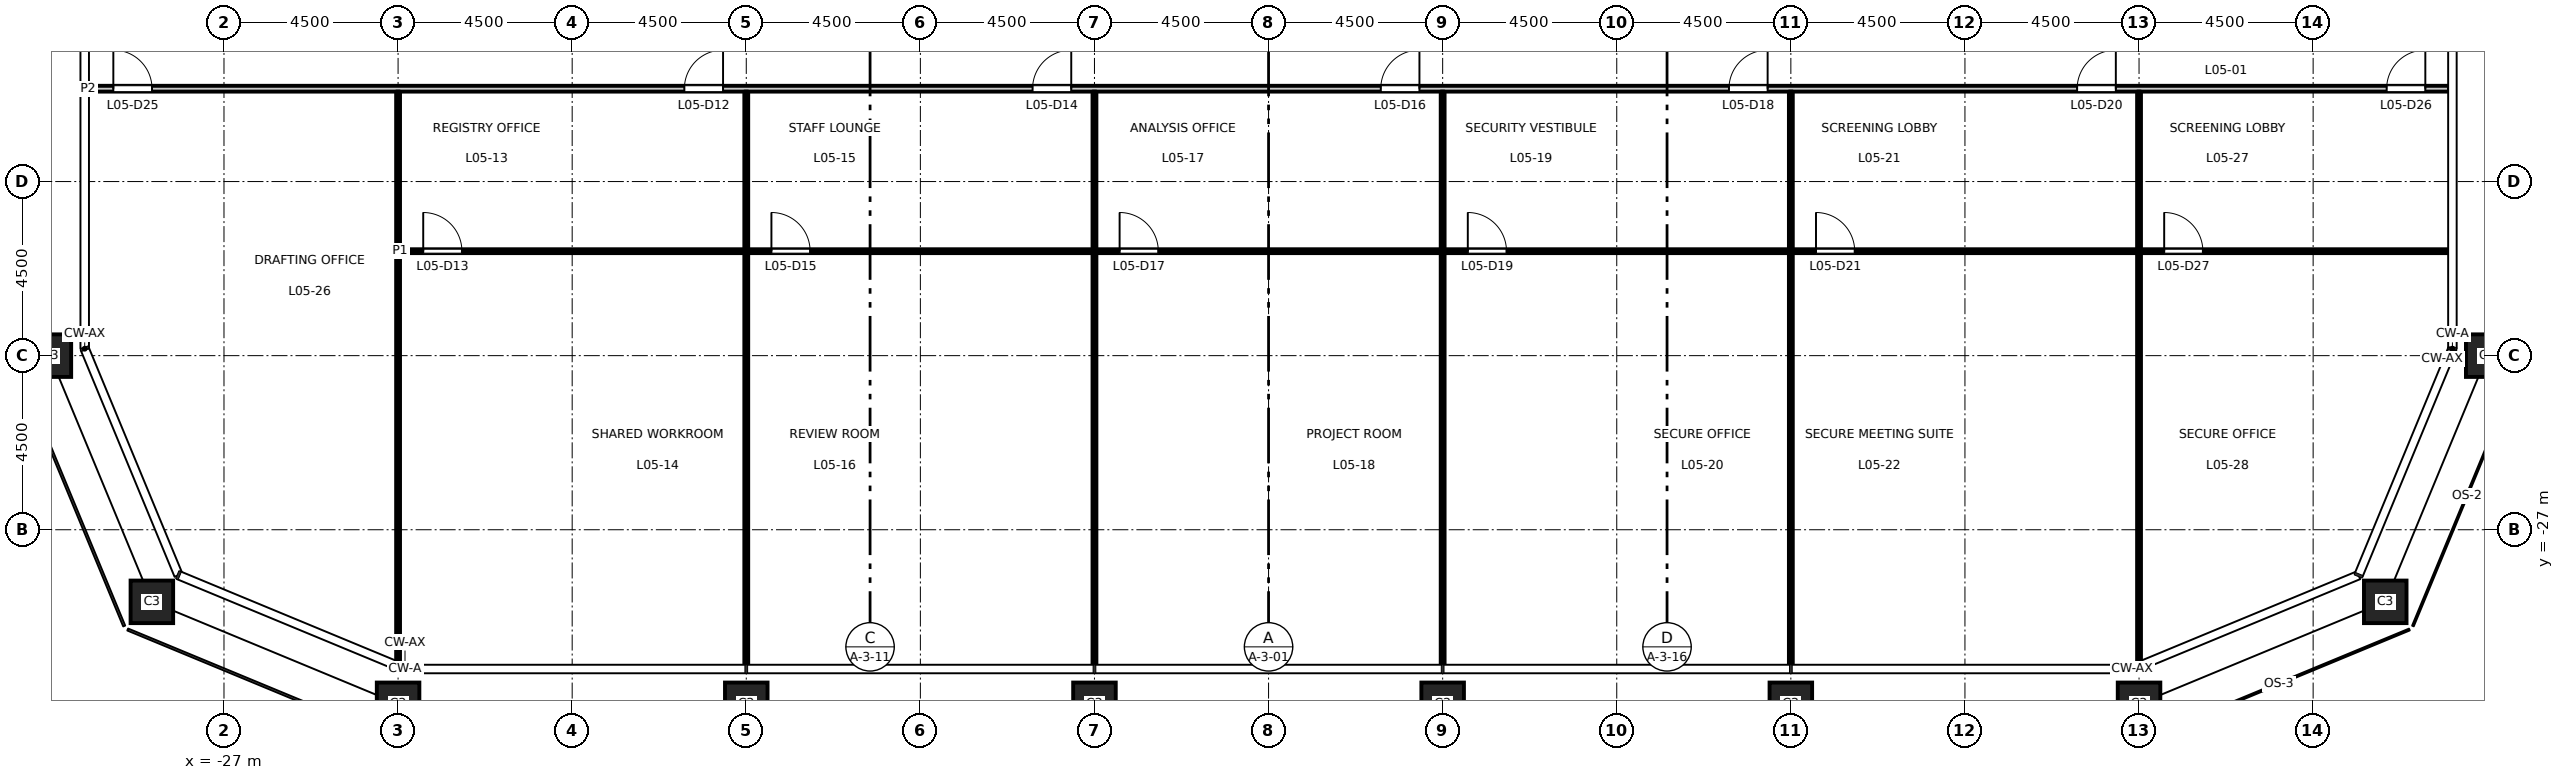
"""IFC4 building model, lengths in metres.
Left out: names, types, materials, properties, quantities, classifications, styles, units other than length and angle.
Written with IfcOpenShell. Run it as: python <this file> out.ifc"""

import sys

from ifc_helpers import new_model, si_unit, direction, frame, frame_2d, origin, origin_2d, place, context, subcontext, project, spatial, rectangle, hollow_rectangle, extrude, element, fill, save


model = new_model("IFC4")
c1 = context("Model", 3, precision=1e-05, world=origin(), true_north=direction((0.0, 1.0)))
c2 = subcontext(c1, "Body", "Model", "MODEL_VIEW")
j1 = project(units=[si_unit("LENGTHUNIT", "METRE"), si_unit("PLANEANGLEUNIT", "RADIAN")], contexts=[c1])
p1 = place(None, origin())
s1 = spatial("IfcSite", under=j1, at=p1, CompositionType="ELEMENT")
p2 = place(p1, origin())
s2 = spatial("IfcBuilding", under=s1, at=p2, CompositionType="ELEMENT")
p3 = place(p2, frame((0.0, 0.0, 26.7)))
s3 = spatial("IfcBuildingStorey", under=s2, at=p3, CompositionType="ELEMENT", Elevation=26.7)
for number, where, z_axis, x_axis in (
    (1, (-22.5, -31.5, 0.0), (0.0, 0.0, 1.0), (1.0, 0.0, 0.0)),
    (2, (-13.5, -31.5, 0.0), (0.0, 0.0, 1.0), (1.0, 0.0, 0.0)),
    (3, (-4.5, -31.5, 0.0), (0.0, 0.0, 1.0), (1.0, 0.0, 0.0)),
    (4, (4.5, -31.5, 0.0), (0.0, 0.0, 1.0), (1.0, 0.0, 0.0)),
    (5, (13.5, -31.5, 0.0), (0.0, 0.0, 1.0), (1.0, 0.0, 0.0)),
    (6, (22.5, -31.5, 0.0), (0.0, 0.0, 1.0), (1.0, 0.0, 0.0)),
    (7, (28.864, -28.864, 0.0), (0.0, 0.0, 1.0), (1.0, 0.0, 0.0)),
    (8, (31.5, -22.5, 0.0), (0.0, 0.0, 1.0), (1.0, 0.0, 0.0)),
    (9, (-31.5, -22.5, 0.0), (0.0, 0.0, 1.0), (1.0, 0.0, 0.0)),
    (10, (-28.864, -28.864, 0.0), (0.0, 0.0, 1.0), (1.0, 0.0, 0.0)),
):
    element("IfcColumn", number, at=place(p3, frame(where, z_axis=z_axis, x_axis=x_axis)), inside=s3, PredefinedType="COLUMN", context=c2, shape_type="SweptSolid", body=[
        extrude(hollow_rectangle(XDim=1.1, YDim=1.1, WallThickness=0.07, at=origin_2d()), origin(), (0.0, 0.0, 1.0), 4.5),
    ])
p4 = place(p3, frame((-22.45, -19.8, 0.0), z_axis=(0.0, 0.0, 1.0), x_axis=(1.0, 0.0, 0.0)))
e11 = element("IfcWall", 11, at=p4, inside=s3, PredefinedType="PARTITIONING", context=c2, shape_type="SweptSolid", body=[
    extrude(rectangle(XDim=52.96, YDim=0.1, at=frame_2d((26.48, 0.0))), origin(), (0.0, 0.0, 1.0), 4.35),
])
p5 = place(p4, frame((0.6, 0.0, 0.0)))
e12 = element("IfcOpeningElement", 12, at=p5, cuts=e11, PredefinedType="OPENING", context=c2, shape_type="SweptSolid", body=[
    extrude(rectangle(XDim=1.0, YDim=2.1, at=frame_2d((0.5, 1.05))), frame((0.0, 0.06, 0.0), z_axis=(0.0, -1.0, 0.0), x_axis=(1.0, 0.0, 0.0)), (0.0, 0.0, 1.0), 0.12),
])
p6 = place(p4, frame((9.6, 0.0, 0.0)))
e13 = element("IfcOpeningElement", 13, at=p6, cuts=e11, PredefinedType="OPENING", context=c2, shape_type="SweptSolid", body=[
    extrude(rectangle(XDim=1.0, YDim=2.1, at=frame_2d((0.5, 1.05))), frame((0.0, 0.06, 0.0), z_axis=(0.0, -1.0, 0.0), x_axis=(1.0, 0.0, 0.0)), (0.0, 0.0, 1.0), 0.12),
])
p7 = place(p4, frame((18.6, 0.0, 0.0)))
e14 = element("IfcOpeningElement", 14, at=p7, cuts=e11, PredefinedType="OPENING", context=c2, shape_type="SweptSolid", body=[
    extrude(rectangle(XDim=1.0, YDim=2.1, at=frame_2d((0.5, 1.05))), frame((0.0, 0.06, 0.0), z_axis=(0.0, -1.0, 0.0), x_axis=(1.0, 0.0, 0.0)), (0.0, 0.0, 1.0), 0.12),
])
p8 = place(p4, frame((27.6, 0.0, 0.0)))
e15 = element("IfcOpeningElement", 15, at=p8, cuts=e11, PredefinedType="OPENING", context=c2, shape_type="SweptSolid", body=[
    extrude(rectangle(XDim=1.0, YDim=2.1, at=frame_2d((0.5, 1.05))), frame((0.0, 0.06, 0.0), z_axis=(0.0, -1.0, 0.0), x_axis=(1.0, 0.0, 0.0)), (0.0, 0.0, 1.0), 0.12),
])
p9 = place(p4, frame((36.6, 0.0, 0.0)))
e16 = element("IfcOpeningElement", 16, at=p9, cuts=e11, PredefinedType="OPENING", context=c2, shape_type="SweptSolid", body=[
    extrude(rectangle(XDim=1.0, YDim=2.1, at=frame_2d((0.5, 1.05))), frame((0.0, 0.06, 0.0), z_axis=(0.0, -1.0, 0.0), x_axis=(1.0, 0.0, 0.0)), (0.0, 0.0, 1.0), 0.12),
])
p10 = place(p4, frame((45.6, 0.0, 0.0)))
e17 = element("IfcOpeningElement", 17, at=p10, cuts=e11, PredefinedType="OPENING", context=c2, shape_type="SweptSolid", body=[
    extrude(rectangle(XDim=1.0, YDim=2.1, at=frame_2d((0.5, 1.05))), frame((0.0, 0.06, 0.0), z_axis=(0.0, -1.0, 0.0), x_axis=(1.0, 0.0, 0.0)), (0.0, 0.0, 1.0), 0.12),
])
p11 = place(p3, frame((-30.51, -15.6, 0.0), z_axis=(0.0, 0.0, 1.0), x_axis=(1.0, 0.0, 0.0)))
e18 = element("IfcWall", 18, at=p11, inside=s3, PredefinedType="PARTITIONING", context=c2, shape_type="SweptSolid", body=[
    extrude(rectangle(XDim=61.02, YDim=0.15, at=frame_2d((30.51, 0.0))), origin(), (0.0, 0.0, 1.0), 4.35),
])
p12 = place(p11, frame((15.41, 0.0, 0.0)))
e19 = element("IfcOpeningElement", 19, at=p12, cuts=e18, PredefinedType="OPENING", context=c2, shape_type="SweptSolid", body=[
    extrude(rectangle(XDim=1.0, YDim=2.1, at=frame_2d((0.5, 1.05))), frame((0.0, 0.085, 0.0), z_axis=(0.0, -1.0, 0.0), x_axis=(1.0, 0.0, 0.0)), (0.0, 0.0, 1.0), 0.17),
])
p13 = place(p11, frame((24.41, 0.0, 0.0)))
e20 = element("IfcOpeningElement", 20, at=p13, cuts=e18, PredefinedType="OPENING", context=c2, shape_type="SweptSolid", body=[
    extrude(rectangle(XDim=1.0, YDim=2.1, at=frame_2d((0.5, 1.05))), frame((0.0, 0.085, 0.0), z_axis=(0.0, -1.0, 0.0), x_axis=(1.0, 0.0, 0.0)), (0.0, 0.0, 1.0), 0.17),
])
p14 = place(p11, frame((33.41, 0.0, 0.0)))
e21 = element("IfcOpeningElement", 21, at=p14, cuts=e18, PredefinedType="OPENING", context=c2, shape_type="SweptSolid", body=[
    extrude(rectangle(XDim=1.0, YDim=2.1, at=frame_2d((0.5, 1.05))), frame((0.0, 0.085, 0.0), z_axis=(0.0, -1.0, 0.0), x_axis=(1.0, 0.0, 0.0)), (0.0, 0.0, 1.0), 0.17),
])
p15 = place(p11, frame((42.41, 0.0, 0.0)))
e22 = element("IfcOpeningElement", 22, at=p15, cuts=e18, PredefinedType="OPENING", context=c2, shape_type="SweptSolid", body=[
    extrude(rectangle(XDim=1.0, YDim=2.1, at=frame_2d((0.5, 1.05))), frame((0.0, 0.085, 0.0), z_axis=(0.0, -1.0, 0.0), x_axis=(1.0, 0.0, 0.0)), (0.0, 0.0, 1.0), 0.17),
])
p16 = place(p11, frame((51.41, 0.0, 0.0)))
e23 = element("IfcOpeningElement", 23, at=p16, cuts=e18, PredefinedType="OPENING", context=c2, shape_type="SweptSolid", body=[
    extrude(rectangle(XDim=1.0, YDim=2.1, at=frame_2d((0.5, 1.05))), frame((0.0, 0.085, 0.0), z_axis=(0.0, -1.0, 0.0), x_axis=(1.0, 0.0, 0.0)), (0.0, 0.0, 1.0), 0.17),
])
p17 = place(p11, frame((0.65, 0.0, 0.0)))
e24 = element("IfcOpeningElement", 24, at=p17, cuts=e18, PredefinedType="OPENING", context=c2, shape_type="SweptSolid", body=[
    extrude(rectangle(XDim=1.0, YDim=2.1, at=frame_2d((0.5, 1.05))), frame((0.0, 0.085, 0.0), z_axis=(0.0, -1.0, 0.0), x_axis=(1.0, 0.0, 0.0)), (0.0, 0.0, 1.0), 0.17),
])
p18 = place(p11, frame((59.41, 0.0, 0.0)))
e25 = element("IfcOpeningElement", 25, at=p18, cuts=e18, PredefinedType="OPENING", context=c2, shape_type="SweptSolid", body=[
    extrude(rectangle(XDim=1.0, YDim=2.1, at=frame_2d((0.5, 1.05))), frame((0.0, 0.085, 0.0), z_axis=(0.0, -1.0, 0.0), x_axis=(1.0, 0.0, 0.0)), (0.0, 0.0, 1.0), 0.17),
])
p19 = place(p3, frame((-22.5, -30.428, 0.0), z_axis=(0.0, 0.0, 1.0), x_axis=(0.0, 1.0, 0.0)))
e26 = element("IfcWall", 26, at=p19, inside=s3, PredefinedType="PARTITIONING", context=c2, shape_type="SweptSolid", body=[
    extrude(rectangle(XDim=14.753, YDim=0.1, at=frame_2d((7.376, 0.0))), origin(), (0.0, 0.0, 1.0), 3.35),
])
p20 = place(p3, frame((-13.5, -30.51, 0.0), z_axis=(0.0, 0.0, 1.0), x_axis=(0.0, 1.0, 0.0)))
e27 = element("IfcWall", 27, at=p20, inside=s3, PredefinedType="PARTITIONING", context=c2, shape_type="SweptSolid", body=[
    extrude(rectangle(XDim=10.66, YDim=0.1, at=frame_2d((5.33, 0.0))), origin(), (0.0, 0.0, 1.0), 3.35),
])
p21 = place(p3, frame((-13.5, -19.75, 0.0), z_axis=(0.0, 0.0, 1.0), x_axis=(0.0, 1.0, 0.0)))
e28 = element("IfcWall", 28, at=p21, inside=s3, PredefinedType="PARTITIONING", context=c2, shape_type="SweptSolid", body=[
    extrude(rectangle(XDim=4.075, YDim=0.1, at=frame_2d((2.038, 0.0))), origin(), (0.0, 0.0, 1.0), 3.35),
])
p22 = place(p3, frame((-4.5, -30.51, 0.0), z_axis=(0.0, 0.0, 1.0), x_axis=(0.0, 1.0, 0.0)))
e29 = element("IfcWall", 29, at=p22, inside=s3, PredefinedType="PARTITIONING", context=c2, shape_type="SweptSolid", body=[
    extrude(rectangle(XDim=10.66, YDim=0.1, at=frame_2d((5.33, 0.0))), origin(), (0.0, 0.0, 1.0), 3.35),
])
p23 = place(p3, frame((-4.5, -19.75, 0.0), z_axis=(0.0, 0.0, 1.0), x_axis=(0.0, 1.0, 0.0)))
e30 = element("IfcWall", 30, at=p23, inside=s3, PredefinedType="PARTITIONING", context=c2, shape_type="SweptSolid", body=[
    extrude(rectangle(XDim=4.075, YDim=0.1, at=frame_2d((2.038, 0.0))), origin(), (0.0, 0.0, 1.0), 3.35),
])
p24 = place(p3, frame((4.5, -30.51, 0.0), z_axis=(0.0, 0.0, 1.0), x_axis=(0.0, 1.0, 0.0)))
e31 = element("IfcWall", 31, at=p24, inside=s3, PredefinedType="PARTITIONING", context=c2, shape_type="SweptSolid", body=[
    extrude(rectangle(XDim=10.66, YDim=0.1, at=frame_2d((5.33, 0.0))), origin(), (0.0, 0.0, 1.0), 3.35),
])
p25 = place(p3, frame((4.5, -19.75, 0.0), z_axis=(0.0, 0.0, 1.0), x_axis=(0.0, 1.0, 0.0)))
e32 = element("IfcWall", 32, at=p25, inside=s3, PredefinedType="PARTITIONING", context=c2, shape_type="SweptSolid", body=[
    extrude(rectangle(XDim=4.075, YDim=0.1, at=frame_2d((2.038, 0.0))), origin(), (0.0, 0.0, 1.0), 3.35),
])
p26 = place(p3, frame((13.5, -30.51, 0.0), z_axis=(0.0, 0.0, 1.0), x_axis=(0.0, 1.0, 0.0)))
e33 = element("IfcWall", 33, at=p26, inside=s3, PredefinedType="PARTITIONING", context=c2, shape_type="SweptSolid", body=[
    extrude(rectangle(XDim=10.66, YDim=0.1, at=frame_2d((5.33, 0.0))), origin(), (0.0, 0.0, 1.0), 3.35),
])
p27 = place(p3, frame((13.5, -19.75, 0.0), z_axis=(0.0, 0.0, 1.0), x_axis=(0.0, 1.0, 0.0)))
e34 = element("IfcWall", 34, at=p27, inside=s3, PredefinedType="PARTITIONING", context=c2, shape_type="SweptSolid", body=[
    extrude(rectangle(XDim=4.075, YDim=0.1, at=frame_2d((2.038, 0.0))), origin(), (0.0, 0.0, 1.0), 3.35),
])
p28 = place(p3, frame((22.5, -30.428, 0.0), z_axis=(0.0, 0.0, 1.0), x_axis=(0.0, 1.0, 0.0)))
e35 = element("IfcWall", 35, at=p28, inside=s3, PredefinedType="PARTITIONING", context=c2, shape_type="SweptSolid", body=[
    extrude(rectangle(XDim=10.578, YDim=0.1, at=frame_2d((5.289, 0.0))), origin(), (0.0, 0.0, 1.0), 3.35),
])
p29 = place(p3, frame((22.5, -19.75, 0.0), z_axis=(0.0, 0.0, 1.0), x_axis=(0.0, 1.0, 0.0)))
e36 = element("IfcWall", 36, at=p29, inside=s3, PredefinedType="PARTITIONING", context=c2, shape_type="SweptSolid", body=[
    extrude(rectangle(XDim=4.075, YDim=0.1, at=frame_2d((2.038, 0.0))), origin(), (0.0, 0.0, 1.0), 3.35),
])
p30 = place(p12, origin())
e37 = element("IfcDoor", 37, at=p30, inside=s3, OperationType="SINGLE_SWING_RIGHT", PredefinedType="DOOR", context=c2, shape_type="SweptSolid", body=[
    extrude(rectangle(XDim=1.0, YDim=2.1, at=frame_2d((0.5, 1.05))), frame((0.0, 0.025, 0.0), z_axis=(0.0, -1.0, 0.0), x_axis=(1.0, 0.0, 0.0)), (0.0, 0.0, 1.0), 0.05),
])
fill(e19, e37)
p31 = place(p5, origin())
e38 = element("IfcDoor", 38, at=p31, inside=s3, OperationType="SINGLE_SWING_LEFT", PredefinedType="DOOR", context=c2, shape_type="SweptSolid", body=[
    extrude(rectangle(XDim=1.0, YDim=2.1, at=frame_2d((0.5, 1.05))), frame((0.0, 0.025, 0.0), z_axis=(0.0, -1.0, 0.0), x_axis=(1.0, 0.0, 0.0)), (0.0, 0.0, 1.0), 0.05),
])
fill(e12, e38)
p32 = place(p13, origin())
e39 = element("IfcDoor", 39, at=p32, inside=s3, OperationType="SINGLE_SWING_RIGHT", PredefinedType="DOOR", context=c2, shape_type="SweptSolid", body=[
    extrude(rectangle(XDim=1.0, YDim=2.1, at=frame_2d((0.5, 1.05))), frame((0.0, 0.025, 0.0), z_axis=(0.0, -1.0, 0.0), x_axis=(1.0, 0.0, 0.0)), (0.0, 0.0, 1.0), 0.05),
])
fill(e20, e39)
p33 = place(p6, origin())
e40 = element("IfcDoor", 40, at=p33, inside=s3, OperationType="SINGLE_SWING_LEFT", PredefinedType="DOOR", context=c2, shape_type="SweptSolid", body=[
    extrude(rectangle(XDim=1.0, YDim=2.1, at=frame_2d((0.5, 1.05))), frame((0.0, 0.025, 0.0), z_axis=(0.0, -1.0, 0.0), x_axis=(1.0, 0.0, 0.0)), (0.0, 0.0, 1.0), 0.05),
])
fill(e13, e40)
p34 = place(p14, origin())
e41 = element("IfcDoor", 41, at=p34, inside=s3, OperationType="SINGLE_SWING_RIGHT", PredefinedType="DOOR", context=c2, shape_type="SweptSolid", body=[
    extrude(rectangle(XDim=1.0, YDim=2.1, at=frame_2d((0.5, 1.05))), frame((0.0, 0.025, 0.0), z_axis=(0.0, -1.0, 0.0), x_axis=(1.0, 0.0, 0.0)), (0.0, 0.0, 1.0), 0.05),
])
fill(e21, e41)
p35 = place(p7, origin())
e42 = element("IfcDoor", 42, at=p35, inside=s3, OperationType="SINGLE_SWING_LEFT", PredefinedType="DOOR", context=c2, shape_type="SweptSolid", body=[
    extrude(rectangle(XDim=1.0, YDim=2.1, at=frame_2d((0.5, 1.05))), frame((0.0, 0.025, 0.0), z_axis=(0.0, -1.0, 0.0), x_axis=(1.0, 0.0, 0.0)), (0.0, 0.0, 1.0), 0.05),
])
fill(e14, e42)
p36 = place(p15, origin())
e43 = element("IfcDoor", 43, at=p36, inside=s3, OperationType="SINGLE_SWING_RIGHT", PredefinedType="DOOR", context=c2, shape_type="SweptSolid", body=[
    extrude(rectangle(XDim=1.0, YDim=2.1, at=frame_2d((0.5, 1.05))), frame((0.0, 0.025, 0.0), z_axis=(0.0, -1.0, 0.0), x_axis=(1.0, 0.0, 0.0)), (0.0, 0.0, 1.0), 0.05),
])
fill(e22, e43)
p37 = place(p8, origin())
e44 = element("IfcDoor", 44, at=p37, inside=s3, OperationType="SINGLE_SWING_LEFT", PredefinedType="DOOR", context=c2, shape_type="SweptSolid", body=[
    extrude(rectangle(XDim=1.0, YDim=2.1, at=frame_2d((0.5, 1.05))), frame((0.0, 0.025, 0.0), z_axis=(0.0, -1.0, 0.0), x_axis=(1.0, 0.0, 0.0)), (0.0, 0.0, 1.0), 0.05),
])
fill(e15, e44)
p38 = place(p16, origin())
e45 = element("IfcDoor", 45, at=p38, inside=s3, OperationType="SINGLE_SWING_RIGHT", PredefinedType="DOOR", context=c2, shape_type="SweptSolid", body=[
    extrude(rectangle(XDim=1.0, YDim=2.1, at=frame_2d((0.5, 1.05))), frame((0.0, 0.025, 0.0), z_axis=(0.0, -1.0, 0.0), x_axis=(1.0, 0.0, 0.0)), (0.0, 0.0, 1.0), 0.05),
])
fill(e23, e45)
p39 = place(p9, origin())
e46 = element("IfcDoor", 46, at=p39, inside=s3, OperationType="SINGLE_SWING_LEFT", PredefinedType="DOOR", context=c2, shape_type="SweptSolid", body=[
    extrude(rectangle(XDim=1.0, YDim=2.1, at=frame_2d((0.5, 1.05))), frame((0.0, 0.025, 0.0), z_axis=(0.0, -1.0, 0.0), x_axis=(1.0, 0.0, 0.0)), (0.0, 0.0, 1.0), 0.05),
])
fill(e16, e46)
p40 = place(p17, origin())
e47 = element("IfcDoor", 47, at=p40, inside=s3, OperationType="SINGLE_SWING_LEFT", PredefinedType="DOOR", context=c2, shape_type="SweptSolid", body=[
    extrude(rectangle(XDim=1.0, YDim=2.1, at=frame_2d((0.5, 1.05))), frame((0.0, 0.025, 0.0), z_axis=(0.0, -1.0, 0.0), x_axis=(1.0, 0.0, 0.0)), (0.0, 0.0, 1.0), 0.05),
])
fill(e24, e47)
p41 = place(p18, origin())
e48 = element("IfcDoor", 48, at=p41, inside=s3, OperationType="SINGLE_SWING_RIGHT", PredefinedType="DOOR", context=c2, shape_type="SweptSolid", body=[
    extrude(rectangle(XDim=1.0, YDim=2.1, at=frame_2d((0.5, 1.05))), frame((0.0, 0.025, 0.0), z_axis=(0.0, -1.0, 0.0), x_axis=(1.0, 0.0, 0.0)), (0.0, 0.0, 1.0), 0.05),
])
fill(e25, e48)
p42 = place(p10, origin())
e49 = element("IfcDoor", 49, at=p42, inside=s3, OperationType="SINGLE_SWING_LEFT", PredefinedType="DOOR", context=c2, shape_type="SweptSolid", body=[
    extrude(rectangle(XDim=1.0, YDim=2.1, at=frame_2d((0.5, 1.05))), frame((0.0, 0.025, 0.0), z_axis=(0.0, -1.0, 0.0), x_axis=(1.0, 0.0, 0.0)), (0.0, 0.0, 1.0), 0.05),
])
fill(e17, e49)
save(model, sys.argv[1])
